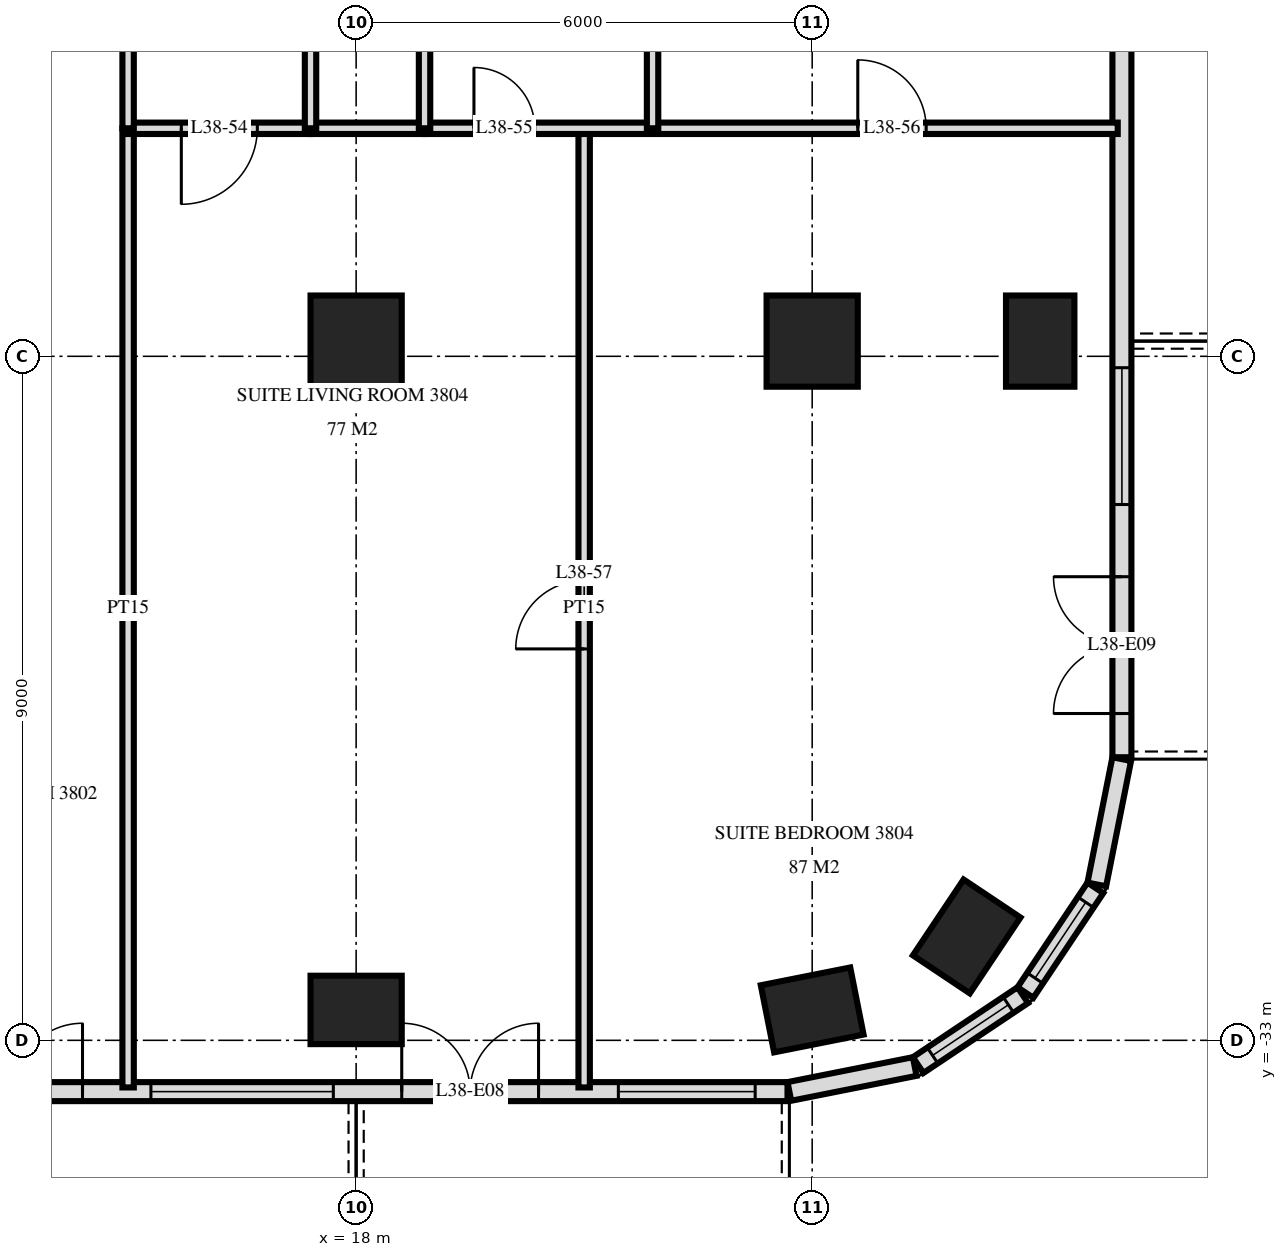
"""IFC4 building model, lengths in metres.
Left out: names, types, materials, properties, quantities, classifications, styles, units other than length and angle.
Written with IfcOpenShell. Run it as: python <this file> out.ifc"""

import sys

from ifc_helpers import new_model, si_unit, direction, frame, frame_2d, origin, origin_2d, place, context, subcontext, project, spatial, rectangle, extrude, element, fill, save


model = new_model("IFC4")
c1 = context("Model", 3, precision=1e-05, world=origin(), true_north=direction((0.0, 1.0)))
c2 = subcontext(c1, "Body", "Model", "MODEL_VIEW")
j1 = project(units=[si_unit("LENGTHUNIT", "METRE"), si_unit("PLANEANGLEUNIT", "RADIAN")], contexts=[c1])
p1 = place(None, origin())
s1 = spatial("IfcSite", under=j1, at=p1, CompositionType="ELEMENT")
p2 = place(p1, origin())
s2 = spatial("IfcBuilding", under=s1, at=p2, CompositionType="ELEMENT")
p3 = place(p2, frame((0.0, 0.0, 148.8)))
s3 = spatial("IfcBuildingStorey", under=s2, at=p3, CompositionType="ELEMENT", Elevation=148.8)
p4 = place(p3, frame((18.0, -32.6, 0.0), z_axis=(0.0, 0.0, 1.0), x_axis=(1.0, 0.0, 0.0)))
e1 = element("IfcColumn", 1, at=p4, inside=s3, PredefinedType="COLUMN", context=c2, shape_type="SweptSolid", body=[
    extrude(rectangle(XDim=1.2, YDim=0.9, at=origin_2d()), origin(), (0.0, 0.0, 1.0), 3.6),
])
p5 = place(p3, frame((18.0, -23.8, 0.0), z_axis=(0.0, 0.0, 1.0), x_axis=(1.0, 0.0, 0.0)))
e2 = element("IfcColumn", 2, at=p5, inside=s3, PredefinedType="COLUMN", context=c2, shape_type="SweptSolid", body=[
    extrude(rectangle(XDim=1.2, YDim=1.2, at=origin_2d()), origin(), (0.0, 0.0, 1.0), 3.6),
])
p6 = place(p3, frame((24.0, -32.6, 0.0), z_axis=(0.0, 0.0, 1.0), x_axis=(0.980792089743, 0.195056086032, 0.0)))
e3 = element("IfcColumn", 3, at=p6, inside=s3, PredefinedType="COLUMN", context=c2, shape_type="SweptSolid", body=[
    extrude(rectangle(XDim=1.2, YDim=0.9, at=origin_2d()), origin(), (0.0, 0.0, 1.0), 3.6),
])
p7 = place(p3, frame((24.0, -23.8, 0.0), z_axis=(0.0, 0.0, 1.0), x_axis=(1.0, 0.0, 0.0)))
e4 = element("IfcColumn", 4, at=p7, inside=s3, PredefinedType="COLUMN", context=c2, shape_type="SweptSolid", body=[
    extrude(rectangle(XDim=1.2, YDim=1.2, at=origin_2d()), origin(), (0.0, 0.0, 1.0), 3.6),
])
for number, where, z_axis, x_axis in (
    (5, (26.033, -31.633, 0.0), (0.0, 0.0, 1.0), (0.556, 0.831, 0.0)),
    (6, (27.0, -23.8, 0.0), (0.0, 0.0, 1.0), (0.0, 1.0, 0.0)),
):
    element("IfcColumn", number, at=place(p3, frame(where, z_axis=z_axis, x_axis=x_axis)), inside=s3, PredefinedType="COLUMN", context=c2, shape_type="SweptSolid", body=[
        extrude(rectangle(XDim=1.2, YDim=0.9, at=origin_2d()), origin(), (0.0, 0.0, 1.0), 3.6),
    ])
p8 = place(p3, frame((-23.675, -33.675, 0.0), z_axis=(0.0, 0.0, 1.0), x_axis=(1.0, 0.0, 0.0)))
e7 = element("IfcWall", 7, at=p8, inside=s3, PredefinedType="SOLIDWALL", context=c2, shape_type="SweptSolid", body=[
    extrude(rectangle(XDim=47.351, YDim=0.25, at=frame_2d((23.675, 0.0))), origin(), (0.0, 0.0, 1.0), 3.32),
])
p9 = place(p8, frame((3.425, 0.0, 0.0)))
e8 = element("IfcOpeningElement", 8, at=p9, cuts=e7, PredefinedType="OPENING", context=c2, shape_type="SweptSolid", body=[
    extrude(rectangle(XDim=1.8, YDim=2.4, at=frame_2d((0.9, 1.2))), frame((0.0, 0.135, 0.0), z_axis=(0.0, -1.0, 0.0), x_axis=(1.0, 0.0, 0.0)), (0.0, 0.0, 1.0), 0.27),
])
p10 = place(p8, frame((6.275, 0.0, 0.0)))
e9 = element("IfcOpeningElement", 9, at=p10, cuts=e7, PredefinedType="OPENING", context=c2, shape_type="SweptSolid", body=[
    extrude(rectangle(XDim=1.8, YDim=2.4, at=frame_2d((0.9, 1.2))), frame((0.0, 0.135, 0.0), z_axis=(0.0, -1.0, 0.0), x_axis=(1.0, 0.0, 0.0)), (0.0, 0.0, 1.0), 0.27),
])
p11 = place(p8, frame((8.975, 0.0, 0.3)))
e10 = element("IfcOpeningElement", 10, at=p11, cuts=e7, PredefinedType="OPENING", context=c2, shape_type="SweptSolid", body=[
    extrude(rectangle(XDim=2.4, YDim=2.1, at=frame_2d((1.2, 1.05))), frame((0.0, 0.135, 0.0), z_axis=(0.0, -1.0, 0.0), x_axis=(1.0, 0.0, 0.0)), (0.0, 0.0, 1.0), 0.27),
])
p12 = place(p8, frame((12.275, 0.0, 0.0)))
e11 = element("IfcOpeningElement", 11, at=p12, cuts=e7, PredefinedType="OPENING", context=c2, shape_type="SweptSolid", body=[
    extrude(rectangle(XDim=1.8, YDim=2.4, at=frame_2d((0.9, 1.2))), frame((0.0, 0.135, 0.0), z_axis=(0.0, -1.0, 0.0), x_axis=(1.0, 0.0, 0.0)), (0.0, 0.0, 1.0), 0.27),
])
p13 = place(p8, frame((14.975, 0.0, 0.3)))
e12 = element("IfcOpeningElement", 12, at=p13, cuts=e7, PredefinedType="OPENING", context=c2, shape_type="SweptSolid", body=[
    extrude(rectangle(XDim=2.4, YDim=2.1, at=frame_2d((1.2, 1.05))), frame((0.0, 0.135, 0.0), z_axis=(0.0, -1.0, 0.0), x_axis=(1.0, 0.0, 0.0)), (0.0, 0.0, 1.0), 0.27),
])
p14 = place(p8, frame((21.275, 0.0, 0.0)))
e13 = element("IfcOpeningElement", 13, at=p14, cuts=e7, PredefinedType="OPENING", context=c2, shape_type="SweptSolid", body=[
    extrude(rectangle(XDim=1.8, YDim=2.4, at=frame_2d((0.9, 1.2))), frame((0.0, 0.135, 0.0), z_axis=(0.0, -1.0, 0.0), x_axis=(1.0, 0.0, 0.0)), (0.0, 0.0, 1.0), 0.27),
])
p15 = place(p8, frame((24.275, 0.0, 0.0)))
e14 = element("IfcOpeningElement", 14, at=p15, cuts=e7, PredefinedType="OPENING", context=c2, shape_type="SweptSolid", body=[
    extrude(rectangle(XDim=1.8, YDim=2.4, at=frame_2d((0.9, 1.2))), frame((0.0, 0.135, 0.0), z_axis=(0.0, -1.0, 0.0), x_axis=(1.0, 0.0, 0.0)), (0.0, 0.0, 1.0), 0.27),
])
p16 = place(p8, frame((30.275, 0.0, 0.0)))
e15 = element("IfcOpeningElement", 15, at=p16, cuts=e7, PredefinedType="OPENING", context=c2, shape_type="SweptSolid", body=[
    extrude(rectangle(XDim=1.8, YDim=2.4, at=frame_2d((0.9, 1.2))), frame((0.0, 0.135, 0.0), z_axis=(0.0, -1.0, 0.0), x_axis=(1.0, 0.0, 0.0)), (0.0, 0.0, 1.0), 0.27),
])
p17 = place(p8, frame((32.975, 0.0, 0.3)))
e16 = element("IfcOpeningElement", 16, at=p17, cuts=e7, PredefinedType="OPENING", context=c2, shape_type="SweptSolid", body=[
    extrude(rectangle(XDim=2.4, YDim=2.1, at=frame_2d((1.2, 1.05))), frame((0.0, 0.135, 0.0), z_axis=(0.0, -1.0, 0.0), x_axis=(1.0, 0.0, 0.0)), (0.0, 0.0, 1.0), 0.27),
])
p18 = place(p8, frame((36.275, 0.0, 0.0)))
e17 = element("IfcOpeningElement", 17, at=p18, cuts=e7, PredefinedType="OPENING", context=c2, shape_type="SweptSolid", body=[
    extrude(rectangle(XDim=1.8, YDim=2.4, at=frame_2d((0.9, 1.2))), frame((0.0, 0.135, 0.0), z_axis=(0.0, -1.0, 0.0), x_axis=(1.0, 0.0, 0.0)), (0.0, 0.0, 1.0), 0.27),
])
p19 = place(p8, frame((38.975, 0.0, 0.3)))
e18 = element("IfcOpeningElement", 18, at=p19, cuts=e7, PredefinedType="OPENING", context=c2, shape_type="SweptSolid", body=[
    extrude(rectangle(XDim=2.4, YDim=2.1, at=frame_2d((1.2, 1.05))), frame((0.0, 0.135, 0.0), z_axis=(0.0, -1.0, 0.0), x_axis=(1.0, 0.0, 0.0)), (0.0, 0.0, 1.0), 0.27),
])
p20 = place(p8, frame((42.275, 0.0, 0.0)))
e19 = element("IfcOpeningElement", 19, at=p20, cuts=e7, PredefinedType="OPENING", context=c2, shape_type="SweptSolid", body=[
    extrude(rectangle(XDim=1.8, YDim=2.4, at=frame_2d((0.9, 1.2))), frame((0.0, 0.135, 0.0), z_axis=(0.0, -1.0, 0.0), x_axis=(1.0, 0.0, 0.0)), (0.0, 0.0, 1.0), 0.27),
])
p21 = place(p8, frame((45.125, 0.0, 0.3)))
e20 = element("IfcOpeningElement", 20, at=p21, cuts=e7, PredefinedType="OPENING", context=c2, shape_type="SweptSolid", body=[
    extrude(rectangle(XDim=1.8, YDim=2.1, at=frame_2d((0.9, 1.05))), frame((0.0, 0.135, 0.0), z_axis=(0.0, -1.0, 0.0), x_axis=(1.0, 0.0, 0.0)), (0.0, 0.0, 1.0), 0.27),
])
p22 = place(p3, frame((23.7, -33.673, 0.0), z_axis=(0.0, 0.0, 1.0), x_axis=(0.980775640221, 0.19513878023, 0.0)))
e21 = element("IfcWall", 21, at=p22, inside=s3, PredefinedType="SOLIDWALL", context=c2, shape_type="SweptSolid", body=[
    extrude(rectangle(XDim=1.681, YDim=0.25, at=frame_2d((0.841, 0.0))), origin(), (0.0, 0.0, 1.0), 3.32),
])
p23 = place(p3, frame((25.394, -33.326, 0.0), z_axis=(0.0, 0.0, 1.0), x_axis=(0.831482937015, 0.55555029066, 0.0)))
e22 = element("IfcWall", 22, at=p23, inside=s3, PredefinedType="SOLIDWALL", context=c2, shape_type="SweptSolid", body=[
    extrude(rectangle(XDim=1.656, YDim=0.25, at=frame_2d((0.828, 0.0))), origin(), (0.0, 0.0, 1.0), 3.32),
])
p24 = place(p23, frame((0.228, 0.0, 0.9)))
e23 = element("IfcOpeningElement", 23, at=p24, cuts=e22, PredefinedType="OPENING", context=c2, shape_type="SweptSolid", body=[
    extrude(rectangle(XDim=1.2, YDim=1.5, at=frame_2d((0.6, 0.75))), frame((0.0, 0.135, 0.0), z_axis=(0.0, -1.0, 0.0), x_axis=(1.0, 0.0, 0.0)), (0.0, 0.0, 1.0), 0.27),
])
p25 = place(p3, frame((26.806, -32.371, 0.0), z_axis=(0.0, 0.0, 1.0), x_axis=(0.55555029066, 0.831482937015, 0.0)))
e24 = element("IfcWall", 24, at=p25, inside=s3, PredefinedType="SOLIDWALL", context=c2, shape_type="SweptSolid", body=[
    extrude(rectangle(XDim=1.656, YDim=0.25, at=frame_2d((0.828, 0.0))), origin(), (0.0, 0.0, 1.0), 3.32),
])
p26 = place(p25, frame((0.228, 0.0, 0.9)))
e25 = element("IfcOpeningElement", 25, at=p26, cuts=e24, PredefinedType="OPENING", context=c2, shape_type="SweptSolid", body=[
    extrude(rectangle(XDim=1.2, YDim=1.5, at=frame_2d((0.6, 0.75))), frame((0.0, 0.135, 0.0), z_axis=(0.0, -1.0, 0.0), x_axis=(1.0, 0.0, 0.0)), (0.0, 0.0, 1.0), 0.27),
])
p27 = place(p3, frame((27.745, -30.949, 0.0), z_axis=(0.0, 0.0, 1.0), x_axis=(0.194999110559, 0.980803419081, 0.0)))
e26 = element("IfcWall", 26, at=p27, inside=s3, PredefinedType="SOLIDWALL", context=c2, shape_type="SweptSolid", body=[
    extrude(rectangle(XDim=1.681, YDim=0.25, at=frame_2d((0.841, 0.0))), origin(), (0.0, 0.0, 1.0), 3.32),
])
p28 = place(p3, frame((28.075, -29.275, 0.0), z_axis=(0.0, 0.0, 1.0), x_axis=(0.0, 1.0, 0.0)))
e27 = element("IfcWall", 27, at=p28, inside=s3, PredefinedType="SOLIDWALL", context=c2, shape_type="SweptSolid", body=[
    extrude(rectangle(XDim=25.951, YDim=0.25, at=frame_2d((12.975, 0.0))), origin(), (0.0, 0.0, 1.0), 3.32),
])
p29 = place(p28, frame((0.575, 0.0, 0.0)))
e28 = element("IfcOpeningElement", 28, at=p29, cuts=e27, PredefinedType="OPENING", context=c2, shape_type="SweptSolid", body=[
    extrude(rectangle(XDim=1.8, YDim=2.4, at=frame_2d((0.9, 1.2))), frame((0.0, 0.135, 0.0), z_axis=(0.0, -1.0, 0.0), x_axis=(1.0, 0.0, 0.0)), (0.0, 0.0, 1.0), 0.27),
])
p30 = place(p28, frame((3.325, 0.0, 0.3)))
e29 = element("IfcOpeningElement", 29, at=p30, cuts=e27, PredefinedType="OPENING", context=c2, shape_type="SweptSolid", body=[
    extrude(rectangle(XDim=1.8, YDim=2.1, at=frame_2d((0.9, 1.05))), frame((0.0, 0.135, 0.0), z_axis=(0.0, -1.0, 0.0), x_axis=(1.0, 0.0, 0.0)), (0.0, 0.0, 1.0), 0.27),
])
p31 = place(p28, frame((9.475, 0.0, 0.0)))
e30 = element("IfcOpeningElement", 30, at=p31, cuts=e27, PredefinedType="OPENING", context=c2, shape_type="SweptSolid", body=[
    extrude(rectangle(XDim=1.8, YDim=2.4, at=frame_2d((0.9, 1.2))), frame((0.0, 0.135, 0.0), z_axis=(0.0, -1.0, 0.0), x_axis=(1.0, 0.0, 0.0)), (0.0, 0.0, 1.0), 0.27),
])
p32 = place(p28, frame((14.575, 0.0, 0.3)))
e31 = element("IfcOpeningElement", 31, at=p32, cuts=e27, PredefinedType="OPENING", context=c2, shape_type="SweptSolid", body=[
    extrude(rectangle(XDim=2.4, YDim=2.1, at=frame_2d((1.2, 1.05))), frame((0.0, 0.135, 0.0), z_axis=(0.0, -1.0, 0.0), x_axis=(1.0, 0.0, 0.0)), (0.0, 0.0, 1.0), 0.27),
])
p33 = place(p28, frame((17.875, 0.0, 0.0)))
e32 = element("IfcOpeningElement", 32, at=p33, cuts=e27, PredefinedType="OPENING", context=c2, shape_type="SweptSolid", body=[
    extrude(rectangle(XDim=1.8, YDim=2.4, at=frame_2d((0.9, 1.2))), frame((0.0, 0.135, 0.0), z_axis=(0.0, -1.0, 0.0), x_axis=(1.0, 0.0, 0.0)), (0.0, 0.0, 1.0), 0.27),
])
p34 = place(p3, frame((21.9, -21.0, 0.0), z_axis=(0.0, 0.0, 1.0), x_axis=(0.0, 1.0, 0.0)))
e33 = element("IfcWall", 33, at=p34, inside=s3, PredefinedType="PARTITIONING", context=c2, shape_type="SweptSolid", body=[
    extrude(rectangle(XDim=4.2, YDim=0.15, at=frame_2d((2.1, 0.0))), origin(), (0.0, 0.0, 1.0), 3.32),
])
p35 = place(p3, frame((21.0, -33.62, 0.0), z_axis=(0.0, 0.0, 1.0), x_axis=(0.0, 1.0, 0.0)))
e34 = element("IfcWall", 34, at=p35, inside=s3, PredefinedType="PARTITIONING", context=c2, shape_type="SweptSolid", body=[
    extrude(rectangle(XDim=12.62, YDim=0.15, at=frame_2d((6.31, 0.0))), origin(), (0.0, 0.0, 1.0), 3.32),
])
p36 = place(p35, frame((5.77, 0.0, 0.0)))
e35 = element("IfcOpeningElement", 35, at=p36, cuts=e34, PredefinedType="OPENING", context=c2, shape_type="SweptSolid", body=[
    extrude(rectangle(XDim=0.9, YDim=2.1, at=frame_2d((0.45, 1.05))), frame((0.0, 0.085, 0.0), z_axis=(0.0, -1.0, 0.0), x_axis=(1.0, 0.0, 0.0)), (0.0, 0.0, 1.0), 0.17),
])
p37 = place(p3, frame((18.9, -21.0, 0.0), z_axis=(0.0, 0.0, 1.0), x_axis=(0.0, 1.0, 0.0)))
e36 = element("IfcWall", 36, at=p37, inside=s3, PredefinedType="PLUMBINGWALL", context=c2, shape_type="SweptSolid", body=[
    extrude(rectangle(XDim=4.2, YDim=0.15, at=frame_2d((2.1, 0.0))), origin(), (0.0, 0.0, 1.0), 3.32),
])
p38 = place(p3, frame((17.4, -21.0, 0.0), z_axis=(0.0, 0.0, 1.0), x_axis=(0.0, 1.0, 0.0)))
e37 = element("IfcWall", 37, at=p38, inside=s3, PredefinedType="PARTITIONING", context=c2, shape_type="SweptSolid", body=[
    extrude(rectangle(XDim=4.2, YDim=0.15, at=frame_2d((2.1, 0.0))), origin(), (0.0, 0.0, 1.0), 3.32),
])
p39 = place(p38, frame((1.6, 0.0, 0.0)))
e38 = element("IfcOpeningElement", 38, at=p39, cuts=e37, PredefinedType="OPENING", context=c2, shape_type="SweptSolid", body=[
    extrude(rectangle(XDim=1.0, YDim=2.1, at=frame_2d((0.5, 1.05))), frame((0.0, 0.085, 0.0), z_axis=(0.0, -1.0, 0.0), x_axis=(1.0, 0.0, 0.0)), (0.0, 0.0, 1.0), 0.17),
])
p40 = place(p3, frame((15.0, -21.0, 0.0), z_axis=(0.0, 0.0, 1.0), x_axis=(0.0, 1.0, 0.0)))
e39 = element("IfcWall", 39, at=p40, inside=s3, PredefinedType="PARTITIONING", context=c2, shape_type="SweptSolid", body=[
    extrude(rectangle(XDim=4.2, YDim=0.15, at=frame_2d((2.1, 0.0))), origin(), (0.0, 0.0, 1.0), 3.32),
])
p41 = place(p3, frame((15.0, -33.62, 0.0), z_axis=(0.0, 0.0, 1.0), x_axis=(0.0, 1.0, 0.0)))
e40 = element("IfcWall", 40, at=p41, inside=s3, PredefinedType="PARTITIONING", context=c2, shape_type="SweptSolid", body=[
    extrude(rectangle(XDim=12.62, YDim=0.15, at=frame_2d((6.31, 0.0))), origin(), (0.0, 0.0, 1.0), 3.32),
])
p42 = place(p3, frame((15.0, -21.0, 0.0), z_axis=(0.0, 0.0, 1.0), x_axis=(1.0, 0.0, 0.0)))
e41 = element("IfcWall", 41, at=p42, inside=s3, PredefinedType="PARTITIONING", context=c2, shape_type="SweptSolid", body=[
    extrude(rectangle(XDim=2.4, YDim=0.15, at=frame_2d((1.2, 0.0))), origin(), (0.0, 0.0, 1.0), 3.32),
])
p43 = place(p42, frame((0.7, 0.0, 0.0)))
e42 = element("IfcOpeningElement", 42, at=p43, cuts=e41, PredefinedType="OPENING", context=c2, shape_type="SweptSolid", body=[
    extrude(rectangle(XDim=1.0, YDim=2.1, at=frame_2d((0.5, 1.05))), frame((0.0, 0.085, 0.0), z_axis=(0.0, -1.0, 0.0), x_axis=(1.0, 0.0, 0.0)), (0.0, 0.0, 1.0), 0.17),
])
p44 = place(p3, frame((18.9, -21.0, 0.0), z_axis=(0.0, 0.0, 1.0), x_axis=(1.0, 0.0, 0.0)))
e43 = element("IfcWall", 43, at=p44, inside=s3, PredefinedType="PARTITIONING", context=c2, shape_type="SweptSolid", body=[
    extrude(rectangle(XDim=9.12, YDim=0.15, at=frame_2d((4.56, 0.0))), origin(), (0.0, 0.0, 1.0), 3.32),
])
p45 = place(p44, frame((0.65, 0.0, 0.0)))
e44 = element("IfcOpeningElement", 44, at=p45, cuts=e43, PredefinedType="OPENING", context=c2, shape_type="SweptSolid", body=[
    extrude(rectangle(XDim=0.8, YDim=2.1, at=frame_2d((0.4, 1.05))), frame((0.0, 0.085, 0.0), z_axis=(0.0, -1.0, 0.0), x_axis=(1.0, 0.0, 0.0)), (0.0, 0.0, 1.0), 0.17),
])
p46 = place(p44, frame((5.7, 0.0, 0.0)))
e45 = element("IfcOpeningElement", 45, at=p46, cuts=e43, PredefinedType="OPENING", context=c2, shape_type="SweptSolid", body=[
    extrude(rectangle(XDim=0.9, YDim=2.1, at=frame_2d((0.45, 1.05))), frame((0.0, 0.085, 0.0), z_axis=(0.0, -1.0, 0.0), x_axis=(1.0, 0.0, 0.0)), (0.0, 0.0, 1.0), 0.17),
])
p47 = place(p3, frame((17.4, -21.0, 0.0), z_axis=(0.0, 0.0, 1.0), x_axis=(1.0, 0.0, 0.0)))
e46 = element("IfcWall", 46, at=p47, inside=s3, PredefinedType="PLUMBINGWALL", context=c2, shape_type="SweptSolid", body=[
    extrude(rectangle(XDim=1.5, YDim=0.15, at=frame_2d((0.75, 0.0))), origin(), (0.0, 0.0, 1.0), 3.32),
])
p48 = place(p24, origin())
e47 = element("IfcWindow", 47, at=p48, inside=s3, PartitioningType="SINGLE_PANEL", PredefinedType="WINDOW", context=c2, shape_type="SweptSolid", body=[
    extrude(rectangle(XDim=1.2, YDim=1.5, at=frame_2d((0.6, 0.75))), frame((0.0, 0.03, 0.0), z_axis=(0.0, -1.0, 0.0), x_axis=(1.0, 0.0, 0.0)), (0.0, 0.0, 1.0), 0.06),
])
fill(e23, e47)
p49 = place(p26, origin())
e48 = element("IfcWindow", 48, at=p49, inside=s3, PartitioningType="SINGLE_PANEL", PredefinedType="WINDOW", context=c2, shape_type="SweptSolid", body=[
    extrude(rectangle(XDim=1.2, YDim=1.5, at=frame_2d((0.6, 0.75))), frame((0.0, 0.03, 0.0), z_axis=(0.0, -1.0, 0.0), x_axis=(1.0, 0.0, 0.0)), (0.0, 0.0, 1.0), 0.06),
])
fill(e25, e48)
p50 = place(p18, origin())
e49 = element("IfcDoor", 49, at=p50, inside=s3, OperationType="DOUBLE_DOOR_SINGLE_SWING", PredefinedType="DOOR", context=c2, shape_type="SweptSolid", body=[
    extrude(rectangle(XDim=1.8, YDim=2.4, at=frame_2d((0.9, 1.2))), frame((0.0, 0.025, 0.0), z_axis=(0.0, -1.0, 0.0), x_axis=(1.0, 0.0, 0.0)), (0.0, 0.0, 1.0), 0.05),
])
fill(e17, e49)
p51 = place(p19, origin())
e50 = element("IfcWindow", 50, at=p51, inside=s3, PartitioningType="SINGLE_PANEL", PredefinedType="WINDOW", context=c2, shape_type="SweptSolid", body=[
    extrude(rectangle(XDim=2.4, YDim=2.1, at=frame_2d((1.2, 1.05))), frame((0.0, 0.03, 0.0), z_axis=(0.0, -1.0, 0.0), x_axis=(1.0, 0.0, 0.0)), (0.0, 0.0, 1.0), 0.06),
])
fill(e18, e50)
p52 = place(p20, origin())
e51 = element("IfcDoor", 51, at=p52, inside=s3, OperationType="DOUBLE_DOOR_SINGLE_SWING", PredefinedType="DOOR", context=c2, shape_type="SweptSolid", body=[
    extrude(rectangle(XDim=1.8, YDim=2.4, at=frame_2d((0.9, 1.2))), frame((0.0, 0.025, 0.0), z_axis=(0.0, -1.0, 0.0), x_axis=(1.0, 0.0, 0.0)), (0.0, 0.0, 1.0), 0.05),
])
fill(e19, e51)
p53 = place(p21, origin())
e52 = element("IfcWindow", 52, at=p53, inside=s3, PartitioningType="SINGLE_PANEL", PredefinedType="WINDOW", context=c2, shape_type="SweptSolid", body=[
    extrude(rectangle(XDim=1.8, YDim=2.1, at=frame_2d((0.9, 1.05))), frame((0.0, 0.03, 0.0), z_axis=(0.0, -1.0, 0.0), x_axis=(1.0, 0.0, 0.0)), (0.0, 0.0, 1.0), 0.06),
])
fill(e20, e52)
p54 = place(p29, origin())
e53 = element("IfcDoor", 53, at=p54, inside=s3, OperationType="DOUBLE_DOOR_SINGLE_SWING", PredefinedType="DOOR", context=c2, shape_type="SweptSolid", body=[
    extrude(rectangle(XDim=1.8, YDim=2.4, at=frame_2d((0.9, 1.2))), frame((0.0, 0.025, 0.0), z_axis=(0.0, -1.0, 0.0), x_axis=(1.0, 0.0, 0.0)), (0.0, 0.0, 1.0), 0.05),
])
fill(e28, e53)
p55 = place(p30, origin())
e54 = element("IfcWindow", 54, at=p55, inside=s3, PartitioningType="SINGLE_PANEL", PredefinedType="WINDOW", context=c2, shape_type="SweptSolid", body=[
    extrude(rectangle(XDim=1.8, YDim=2.1, at=frame_2d((0.9, 1.05))), frame((0.0, 0.03, 0.0), z_axis=(0.0, -1.0, 0.0), x_axis=(1.0, 0.0, 0.0)), (0.0, 0.0, 1.0), 0.06),
])
fill(e29, e54)
p56 = place(p43, frame((0.5, 0.0, 0.0), z_axis=(0.0, 0.0, 1.0), x_axis=(-1.0, 0.0, 0.0)))
e55 = element("IfcDoor", 55, at=p56, inside=s3, OperationType="SINGLE_SWING_LEFT", PredefinedType="DOOR", context=c2, shape_type="SweptSolid", body=[
    extrude(rectangle(XDim=1.0, YDim=2.1, at=frame_2d((0.0, 1.05))), frame((0.0, -0.025, 0.0), z_axis=(0.0, 1.0, 0.0), x_axis=(-1.0, 0.0, 0.0)), (0.0, 0.0, 1.0), 0.05),
])
fill(e42, e55)
p57 = place(p45, origin())
e56 = element("IfcDoor", 56, at=p57, inside=s3, OperationType="SINGLE_SWING_RIGHT", PredefinedType="DOOR", context=c2, shape_type="SweptSolid", body=[
    extrude(rectangle(XDim=0.8, YDim=2.1, at=frame_2d((0.4, 1.05))), frame((0.0, 0.025, 0.0), z_axis=(0.0, -1.0, 0.0), x_axis=(1.0, 0.0, 0.0)), (0.0, 0.0, 1.0), 0.05),
])
fill(e44, e56)
p58 = place(p46, origin())
e57 = element("IfcDoor", 57, at=p58, inside=s3, OperationType="SINGLE_SWING_RIGHT", PredefinedType="DOOR", context=c2, shape_type="SweptSolid", body=[
    extrude(rectangle(XDim=0.9, YDim=2.1, at=frame_2d((0.45, 1.05))), frame((0.0, 0.025, 0.0), z_axis=(0.0, -1.0, 0.0), x_axis=(1.0, 0.0, 0.0)), (0.0, 0.0, 1.0), 0.05),
])
fill(e45, e57)
p59 = place(p36, origin())
e58 = element("IfcDoor", 58, at=p59, inside=s3, OperationType="SINGLE_SWING_RIGHT", PredefinedType="DOOR", context=c2, shape_type="SweptSolid", body=[
    extrude(rectangle(XDim=0.9, YDim=2.1, at=frame_2d((0.45, 1.05))), frame((0.0, 0.025, 0.0), z_axis=(0.0, -1.0, 0.0), x_axis=(1.0, 0.0, 0.0)), (0.0, 0.0, 1.0), 0.05),
])
fill(e35, e58)
save(model, sys.argv[1])
